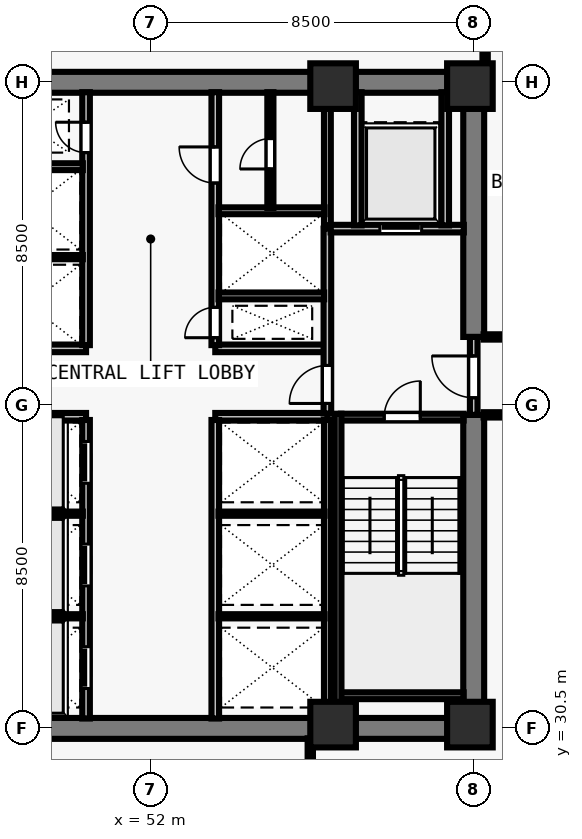
"""IFC4 building model, lengths in metres.
Left out: names, types, materials, properties, quantities, classifications, styles, units other than length and angle.
Written with IfcOpenShell. Run it as: python <this file> out.ifc"""

import sys

from ifc_helpers import new_model, si_unit, direction, frame, frame_2d, origin, origin_2d, place, context, subcontext, project, spatial, rectangle, extrude, element, fill, save


model = new_model("IFC4")
c1 = context("Model", 3, precision=1e-05, world=origin(), true_north=direction((0.0, 1.0)))
c2 = subcontext(c1, "Body", "Model", "MODEL_VIEW")
j1 = project(units=[si_unit("LENGTHUNIT", "METRE"), si_unit("PLANEANGLEUNIT", "RADIAN")], contexts=[c1])
p1 = place(None, origin())
s1 = spatial("IfcSite", under=j1, at=p1, CompositionType="ELEMENT")
p2 = place(p1, origin())
s2 = spatial("IfcBuilding", under=s1, at=p2, CompositionType="ELEMENT")
p3 = place(p2, frame((0.0, 0.0, 69.0)))
s3 = spatial("IfcBuildingStorey", under=s2, at=p3, CompositionType="ELEMENT", Elevation=69.0)
for number, where, z_axis, x_axis in (
    (1, (56.8, 30.6, 0.0), (0.0, 0.0, 1.0), (1.0, 0.0, 0.0)),
    (2, (60.4, 30.6, 0.0), (0.0, 0.0, 1.0), (1.0, 0.0, 0.0)),
    (3, (56.8, 47.4, 0.0), (0.0, 0.0, 1.0), (1.0, 0.0, 0.0)),
    (4, (60.4, 47.4, 0.0), (0.0, 0.0, 1.0), (1.0, 0.0, 0.0)),
):
    element("IfcColumn", number, at=place(p3, frame(where, z_axis=z_axis, x_axis=x_axis)), inside=s3, PredefinedType="COLUMN", context=c2, shape_type="SweptSolid", body=[
        extrude(rectangle(XDim=1.2, YDim=1.2, at=origin_2d()), origin(), (0.0, 0.0, 1.0), 3.5),
    ])
for number, where, z_axis, x_axis in (
    (5, (43.225, 30.5, 0.0), (0.0, 0.0, 1.0), (1.0, 0.0, 0.0)),
    (6, (43.225, 47.5, 0.0), (0.0, 0.0, 1.0), (1.0, 0.0, 0.0)),
):
    element("IfcWall", number, at=place(p3, frame(where, z_axis=z_axis, x_axis=x_axis)), inside=s3, PredefinedType="SHEAR", context=c2, shape_type="SweptSolid", body=[
        extrude(rectangle(XDim=17.55, YDim=0.55, at=frame_2d((8.775, 0.0))), origin(), (0.0, 0.0, 1.0), 3.28),
    ])
p4 = place(p3, frame((60.5, 30.765, 0.0), z_axis=(0.0, 0.0, 1.0), x_axis=(0.0, 1.0, 0.0)))
e7 = element("IfcWall", 7, at=p4, inside=s3, PredefinedType="SHEAR", context=c2, shape_type="SweptSolid", body=[
    extrude(rectangle(XDim=7.985, YDim=0.55, at=frame_2d((3.993, 0.0))), origin(), (0.0, 0.0, 1.0), 3.28),
])
p5 = place(p3, frame((60.5, 40.8, 0.0), z_axis=(0.0, 0.0, 1.0), x_axis=(0.0, 1.0, 0.0)))
e8 = element("IfcWall", 8, at=p5, inside=s3, PredefinedType="SHEAR", context=c2, shape_type="SweptSolid", body=[
    extrude(rectangle(XDim=6.435, YDim=0.55, at=frame_2d((3.218, 0.0))), origin(), (0.0, 0.0, 1.0), 3.28),
])
for number, where, z_axis, x_axis in (
    (9, (47.35, 38.7, 0.0), (0.0, 0.0, 1.0), (1.0, 0.0, 0.0)),
    (10, (47.35, 40.5, 0.0), (0.0, 0.0, 1.0), (1.0, 0.0, 0.0)),
    (11, (53.7, 38.7, 0.0), (0.0, 0.0, 1.0), (1.0, 0.0, 0.0)),
    (12, (53.7, 40.5, 0.0), (0.0, 0.0, 1.0), (1.0, 0.0, 0.0)),
):
    element("IfcWall", number, at=place(p3, frame(where, z_axis=z_axis, x_axis=x_axis)), inside=s3, PredefinedType="SOLIDWALL", context=c2, shape_type="SweptSolid", body=[
        extrude(rectangle(XDim=2.95, YDim=0.2, at=frame_2d((1.475, 0.0))), origin(), (0.0, 0.0, 1.0), 3.28),
    ])
p6 = place(p3, frame((50.3, 30.76, 0.0), z_axis=(0.0, 0.0, 1.0), x_axis=(0.0, 1.0, 0.0)))
e13 = element("IfcWall", 13, at=p6, inside=s3, PredefinedType="SOLIDWALL", context=c2, shape_type="SweptSolid", body=[
    extrude(rectangle(XDim=7.855, YDim=0.2, at=frame_2d((3.927, 0.0))), origin(), (0.0, 0.0, 1.0), 3.28),
])
p7 = place(p6, frame((0.79, 0.0, 0.0)))
e14 = element("IfcOpeningElement", 14, at=p7, cuts=e13, PredefinedType="OPENING", context=c2, shape_type="SweptSolid", body=[
    extrude(rectangle(XDim=1.1, YDim=2.2, at=frame_2d((0.55, 1.1))), frame((0.0, 0.11, 0.0), z_axis=(0.0, -1.0, 0.0), x_axis=(1.0, 0.0, 0.0)), (0.0, 0.0, 1.0), 0.22),
])
p8 = place(p6, frame((3.49, 0.0, 0.0)))
e15 = element("IfcOpeningElement", 15, at=p8, cuts=e13, PredefinedType="OPENING", context=c2, shape_type="SweptSolid", body=[
    extrude(rectangle(XDim=1.1, YDim=2.2, at=frame_2d((0.55, 1.1))), frame((0.0, 0.11, 0.0), z_axis=(0.0, -1.0, 0.0), x_axis=(1.0, 0.0, 0.0)), (0.0, 0.0, 1.0), 0.22),
])
p9 = place(p6, frame((6.19, 0.0, 0.0)))
e16 = element("IfcOpeningElement", 16, at=p9, cuts=e13, PredefinedType="OPENING", context=c2, shape_type="SweptSolid", body=[
    extrude(rectangle(XDim=1.1, YDim=2.2, at=frame_2d((0.55, 1.1))), frame((0.0, 0.11, 0.0), z_axis=(0.0, -1.0, 0.0), x_axis=(1.0, 0.0, 0.0)), (0.0, 0.0, 1.0), 0.22),
])
p10 = place(p3, frame((53.7, 30.76, 0.0), z_axis=(0.0, 0.0, 1.0), x_axis=(0.0, 1.0, 0.0)))
e17 = element("IfcWall", 17, at=p10, inside=s3, PredefinedType="SOLIDWALL", context=c2, shape_type="SweptSolid", body=[
    extrude(rectangle(XDim=7.855, YDim=0.2, at=frame_2d((3.927, 0.0))), origin(), (0.0, 0.0, 1.0), 3.28),
])
p11 = place(p3, frame((50.3, 40.585, 0.0), z_axis=(0.0, 0.0, 1.0), x_axis=(0.0, 1.0, 0.0)))
e18 = element("IfcWall", 18, at=p11, inside=s3, PredefinedType="SOLIDWALL", context=c2, shape_type="SweptSolid", body=[
    extrude(rectangle(XDim=6.655, YDim=0.2, at=frame_2d((3.328, 0.0))), origin(), (0.0, 0.0, 1.0), 3.28),
])
p12 = place(p11, frame((5.065, 0.0, 0.0)))
e19 = element("IfcOpeningElement", 19, at=p12, cuts=e18, PredefinedType="OPENING", context=c2, shape_type="SweptSolid", body=[
    extrude(rectangle(XDim=0.8, YDim=2.08, at=frame_2d((0.4, 1.04))), frame((0.0, 0.11, 0.0), z_axis=(0.0, -1.0, 0.0), x_axis=(1.0, 0.0, 0.0)), (0.0, 0.0, 1.0), 0.22),
])
p13 = place(p3, frame((53.7, 40.585, 0.0), z_axis=(0.0, 0.0, 1.0), x_axis=(0.0, 1.0, 0.0)))
e20 = element("IfcWall", 20, at=p13, inside=s3, PredefinedType="SOLIDWALL", context=c2, shape_type="SweptSolid", body=[
    extrude(rectangle(XDim=6.655, YDim=0.2, at=frame_2d((3.328, 0.0))), origin(), (0.0, 0.0, 1.0), 3.28),
])
p14 = place(p13, frame((0.195, 0.0, 0.0)))
e21 = element("IfcOpeningElement", 21, at=p14, cuts=e20, PredefinedType="OPENING", context=c2, shape_type="SweptSolid", body=[
    extrude(rectangle(XDim=0.8, YDim=2.08, at=frame_2d((0.4, 1.04))), frame((0.0, 0.11, 0.0), z_axis=(0.0, -1.0, 0.0), x_axis=(1.0, 0.0, 0.0)), (0.0, 0.0, 1.0), 0.22),
])
p15 = place(p13, frame((4.265, 0.0, 0.0)))
e22 = element("IfcOpeningElement", 22, at=p15, cuts=e20, PredefinedType="OPENING", context=c2, shape_type="SweptSolid", body=[
    extrude(rectangle(XDim=0.95, YDim=2.12, at=frame_2d((0.475, 1.06))), frame((0.0, 0.11, 0.0), z_axis=(0.0, -1.0, 0.0), x_axis=(1.0, 0.0, 0.0)), (0.0, 0.0, 1.0), 0.22),
])
p16 = place(p3, frame((60.5, 38.75, 0.0), z_axis=(0.0, 0.0, 1.0), x_axis=(0.0, 1.0, 0.0)))
e23 = element("IfcWall", 23, at=p16, inside=s3, PredefinedType="SOLIDWALL", context=c2, shape_type="SweptSolid", body=[
    extrude(rectangle(XDim=2.05, YDim=0.2, at=frame_2d((1.025, 0.0))), origin(), (0.0, 0.0, 1.0), 3.28),
])
p17 = place(p16, frame((0.45, 0.0, 0.0)))
e24 = element("IfcOpeningElement", 24, at=p17, cuts=e23, PredefinedType="OPENING", context=c2, shape_type="SweptSolid", body=[
    extrude(rectangle(XDim=1.1, YDim=2.15, at=frame_2d((0.55, 1.075))), frame((0.0, 0.11, 0.0), z_axis=(0.0, -1.0, 0.0), x_axis=(1.0, 0.0, 0.0)), (0.0, 0.0, 1.0), 0.22),
])
p18 = place(p3, frame((56.65, 38.785, 0.0), z_axis=(0.0, 0.0, 1.0), x_axis=(0.0, 1.0, 0.0)))
e25 = element("IfcWall", 25, at=p18, inside=s3, PredefinedType="SOLIDWALL", context=c2, shape_type="SweptSolid", body=[
    extrude(rectangle(XDim=4.865, YDim=0.2, at=frame_2d((2.433, 0.0))), origin(), (0.0, 0.0, 1.0), 3.28),
])
p19 = place(p18, frame((0.265, 0.0, 0.0)))
e26 = element("IfcOpeningElement", 26, at=p19, cuts=e25, PredefinedType="OPENING", context=c2, shape_type="SweptSolid", body=[
    extrude(rectangle(XDim=1.0, YDim=2.15, at=frame_2d((0.5, 1.075))), frame((0.0, 0.11, 0.0), z_axis=(0.0, -1.0, 0.0), x_axis=(1.0, 0.0, 0.0)), (0.0, 0.0, 1.0), 0.22),
])
p20 = place(p3, frame((56.735, 43.65, 0.0), z_axis=(0.0, 0.0, 1.0), x_axis=(1.0, 0.0, 0.0)))
e27 = element("IfcWall", 27, at=p20, inside=s3, PredefinedType="SOLIDWALL", context=c2, shape_type="SweptSolid", body=[
    extrude(rectangle(XDim=3.505, YDim=0.2, at=frame_2d((1.752, 0.0))), origin(), (0.0, 0.0, 1.0), 3.28),
])
p21 = place(p20, frame((1.295, 0.0, 0.0)))
e28 = element("IfcOpeningElement", 28, at=p21, cuts=e27, PredefinedType="OPENING", context=c2, shape_type="SweptSolid", body=[
    extrude(rectangle(XDim=1.1, YDim=2.2, at=frame_2d((0.55, 1.1))), frame((0.0, 0.11, 0.0), z_axis=(0.0, -1.0, 0.0), x_axis=(1.0, 0.0, 0.0)), (0.0, 0.0, 1.0), 0.22),
])
for number, where, z_axis, x_axis in (
    (29, (57.45, 43.735, 0.0), (0.0, 0.0, 1.0), (0.0, 1.0, 0.0)),
    (30, (59.75, 43.735, 0.0), (0.0, 0.0, 1.0), (0.0, 1.0, 0.0)),
):
    element("IfcWall", number, at=place(p3, frame(where, z_axis=z_axis, x_axis=x_axis)), inside=s3, PredefinedType="SOLIDWALL", context=c2, shape_type="SweptSolid", body=[
        extrude(rectangle(XDim=3.505, YDim=0.2, at=frame_2d((1.752, 0.0))), origin(), (0.0, 0.0, 1.0), 3.28),
    ])
for number, where, z_axis, x_axis in (
    (31, (47.425, 33.45, 0.0), (0.0, 0.0, 1.0), (1.0, 0.0, 0.0)),
    (32, (47.425, 36.15, 0.0), (0.0, 0.0, 1.0), (1.0, 0.0, 0.0)),
):
    element("IfcWall", number, at=place(p3, frame(where, z_axis=z_axis, x_axis=x_axis)), inside=s3, PredefinedType="PARTITIONING", context=c2, shape_type="SweptSolid", body=[
        extrude(rectangle(XDim=2.79, YDim=0.11, at=frame_2d((1.395, 0.0))), origin(), (0.0, 0.0, 1.0), 3.28),
    ])
p22 = place(p3, frame((56.65, 30.76, 0.0), z_axis=(0.0, 0.0, 1.0), x_axis=(0.0, 1.0, 0.0)))
e33 = element("IfcWall", 33, at=p22, inside=s3, PredefinedType="SOLIDWALL", context=c2, shape_type="SweptSolid", body=[
    extrude(rectangle(XDim=7.855, YDim=0.18, at=frame_2d((3.927, 0.0))), origin(), (0.0, 0.0, 1.0), 3.28),
])
for number, where, z_axis, x_axis in (
    (34, (53.785, 33.45, 0.0), (0.0, 0.0, 1.0), (1.0, 0.0, 0.0)),
    (35, (53.785, 36.15, 0.0), (0.0, 0.0, 1.0), (1.0, 0.0, 0.0)),
):
    element("IfcWall", number, at=place(p3, frame(where, z_axis=z_axis, x_axis=x_axis)), inside=s3, PredefinedType="PARTITIONING", context=c2, shape_type="SweptSolid", body=[
        extrude(rectangle(XDim=2.79, YDim=0.11, at=frame_2d((1.395, 0.0))), origin(), (0.0, 0.0, 1.0), 3.28),
    ])
p23 = place(p3, frame((47.435, 42.9, 0.0), z_axis=(0.0, 0.0, 1.0), x_axis=(1.0, 0.0, 0.0)))
e36 = element("IfcWall", 36, at=p23, inside=s3, PredefinedType="PARTITIONING", context=c2, shape_type="SweptSolid", body=[
    extrude(rectangle(XDim=2.78, YDim=0.11, at=frame_2d((1.39, 0.0))), origin(), (0.0, 0.0, 1.0), 3.28),
])
p24 = place(p3, frame((47.425, 45.28, 0.0), z_axis=(0.0, 0.0, 1.0), x_axis=(1.0, 0.0, 0.0)))
e37 = element("IfcWall", 37, at=p24, inside=s3, PredefinedType="SOLIDWALL", context=c2, shape_type="SweptSolid", body=[
    extrude(rectangle(XDim=2.79, YDim=0.18, at=frame_2d((1.395, 0.0))), origin(), (0.0, 0.0, 1.0), 3.28),
])
p25 = place(p3, frame((56.65, 43.735, 0.0), z_axis=(0.0, 0.0, 1.0), x_axis=(0.0, 1.0, 0.0)))
e38 = element("IfcWall", 38, at=p25, inside=s3, PredefinedType="SOLIDWALL", context=c2, shape_type="SweptSolid", body=[
    extrude(rectangle(XDim=3.505, YDim=0.18, at=frame_2d((1.752, 0.0))), origin(), (0.0, 0.0, 1.0), 3.28),
])
p26 = place(p3, frame((53.785, 41.88, 0.0), z_axis=(0.0, 0.0, 1.0), x_axis=(1.0, 0.0, 0.0)))
e39 = element("IfcWall", 39, at=p26, inside=s3, PredefinedType="SOLIDWALL", context=c2, shape_type="SweptSolid", body=[
    extrude(rectangle(XDim=2.78, YDim=0.18, at=frame_2d((1.39, 0.0))), origin(), (0.0, 0.0, 1.0), 3.28),
])
p27 = place(p3, frame((53.785, 44.12, 0.0), z_axis=(0.0, 0.0, 1.0), x_axis=(1.0, 0.0, 0.0)))
e40 = element("IfcWall", 40, at=p27, inside=s3, PredefinedType="SOLIDWALL", context=c2, shape_type="SweptSolid", body=[
    extrude(rectangle(XDim=2.79, YDim=0.18, at=frame_2d((1.395, 0.0))), origin(), (0.0, 0.0, 1.0), 3.28),
])
p28 = place(p3, frame((55.15, 44.195, 0.0), z_axis=(0.0, 0.0, 1.0), x_axis=(0.0, 1.0, 0.0)))
e41 = element("IfcWall", 41, at=p28, inside=s3, PredefinedType="PARTITIONING", context=c2, shape_type="SweptSolid", body=[
    extrude(rectangle(XDim=3.045, YDim=0.16, at=frame_2d((1.522, 0.0))), origin(), (0.0, 0.0, 1.0), 3.28),
])
p29 = place(p28, frame((1.025, 0.0, 0.0)))
e42 = element("IfcOpeningElement", 42, at=p29, cuts=e41, PredefinedType="OPENING", context=c2, shape_type="SweptSolid", body=[
    extrude(rectangle(XDim=0.8, YDim=2.1, at=frame_2d((0.4, 1.05))), frame((0.0, 0.09, 0.0), z_axis=(0.0, -1.0, 0.0), x_axis=(1.0, 0.0, 0.0)), (0.0, 0.0, 1.0), 0.18),
])
for number, where, z_axis, x_axis in (
    (43, (60.76, 38.75, 0.0), (0.0, 0.0, 1.0), (1.0, 0.0, 0.0)),
    (44, (60.76, 40.8, 0.0), (0.0, 0.0, 1.0), (1.0, 0.0, 0.0)),
):
    element("IfcWall", number, at=place(p3, frame(where, z_axis=z_axis, x_axis=x_axis)), inside=s3, PredefinedType="PARTITIONING", context=c2, shape_type="SweptSolid", body=[
        extrude(rectangle(XDim=5.985, YDim=0.14, at=frame_2d((2.993, 0.0))), origin(), (0.0, 0.0, 1.0), 3.28),
    ])
p30 = place(p3, frame((56.2, 23.655, 0.0), z_axis=(0.0, 0.0, 1.0), x_axis=(0.0, 1.0, 0.0)))
e45 = element("IfcWall", 45, at=p30, inside=s3, PredefinedType="PARTITIONING", context=c2, shape_type="SweptSolid", body=[
    extrude(rectangle(XDim=6.585, YDim=0.14, at=frame_2d((3.292, 0.0))), origin(), (0.0, 0.0, 1.0), 2.849),
])
p31 = place(p3, frame((60.8, 47.76, 0.0), z_axis=(0.0, 0.0, 1.0), x_axis=(0.0, 1.0, 0.0)))
e46 = element("IfcWall", 46, at=p31, inside=s3, PredefinedType="PARTITIONING", context=c2, shape_type="SweptSolid", body=[
    extrude(rectangle(XDim=6.585, YDim=0.14, at=frame_2d((3.292, 0.0))), origin(), (0.0, 0.0, 1.0), 2.439),
])
p32 = place(p3, frame((57.005, 38.69, 0.0), z_axis=(0.0, 0.0, 1.0), x_axis=(1.0, 0.0, 0.0)))
e47 = element("IfcWall", 47, at=p32, inside=s3, PredefinedType="SOLIDWALL", context=c2, shape_type="SweptSolid", body=[
    extrude(rectangle(XDim=3.23, YDim=0.18, at=frame_2d((1.615, 0.0))), origin(), (0.0, 0.0, 1.0), 3.28),
])
p33 = place(p32, frame((1.14, 0.0, 0.0)))
e48 = element("IfcOpeningElement", 48, at=p33, cuts=e47, PredefinedType="OPENING", context=c2, shape_type="SweptSolid", body=[
    extrude(rectangle(XDim=0.95, YDim=2.15, at=frame_2d((0.475, 1.075))), frame((0.0, 0.1, 0.0), z_axis=(0.0, -1.0, 0.0), x_axis=(1.0, 0.0, 0.0)), (0.0, 0.0, 1.0), 0.2),
])
p34 = place(p3, frame((57.005, 31.36, 0.0), z_axis=(0.0, 0.0, 1.0), x_axis=(1.0, 0.0, 0.0)))
e49 = element("IfcWall", 49, at=p34, inside=s3, PredefinedType="SOLIDWALL", context=c2, shape_type="SweptSolid", body=[
    extrude(rectangle(XDim=3.23, YDim=0.18, at=frame_2d((1.615, 0.0))), origin(), (0.0, 0.0, 1.0), 3.28),
])
p35 = place(p3, frame((56.93, 38.78, 0.0), z_axis=(0.0, 0.0, 1.0), x_axis=(0.0, -1.0, 0.0)))
e50 = element("IfcWall", 50, at=p35, inside=s3, PredefinedType="SOLIDWALL", context=c2, shape_type="SweptSolid", body=[
    extrude(rectangle(XDim=8.017, YDim=0.18, at=frame_2d((4.009, 0.0))), origin(), (0.0, 0.0, 1.0), 3.28),
])
p36 = place(p17, origin())
e51 = element("IfcDoor", 51, at=p36, inside=s3, OperationType="SINGLE_SWING_RIGHT", PredefinedType="DOOR", context=c2, shape_type="SweptSolid", body=[
    extrude(rectangle(XDim=1.1, YDim=2.15, at=frame_2d((0.55, 1.075))), frame((0.0, 0.025, 0.0), z_axis=(0.0, -1.0, 0.0), x_axis=(1.0, 0.0, 0.0)), (0.0, 0.0, 1.0), 0.05),
])
fill(e24, e51)
p37 = place(p19, origin())
e52 = element("IfcDoor", 52, at=p37, inside=s3, OperationType="SINGLE_SWING_LEFT", PredefinedType="DOOR", context=c2, shape_type="SweptSolid", body=[
    extrude(rectangle(XDim=1.0, YDim=2.15, at=frame_2d((0.5, 1.075))), frame((0.0, 0.025, 0.0), z_axis=(0.0, -1.0, 0.0), x_axis=(1.0, 0.0, 0.0)), (0.0, 0.0, 1.0), 0.05),
])
fill(e26, e52)
p38 = place(p21, origin())
e53 = element("IfcDoor", 53, at=p38, inside=s3, OperationType="SLIDING_TO_LEFT", PredefinedType="DOOR", context=c2, shape_type="SweptSolid", body=[
    extrude(rectangle(XDim=1.1, YDim=2.2, at=frame_2d((0.55, 1.1))), frame((0.0, 0.025, 0.0), z_axis=(0.0, -1.0, 0.0), x_axis=(1.0, 0.0, 0.0)), (0.0, 0.0, 1.0), 0.05),
])
fill(e28, e53)
p39 = place(p7, origin())
e54 = element("IfcDoor", 54, at=p39, inside=s3, OperationType="SLIDING_TO_LEFT", PredefinedType="DOOR", context=c2, shape_type="SweptSolid", body=[
    extrude(rectangle(XDim=1.1, YDim=2.2, at=frame_2d((0.55, 1.1))), frame((0.0, 0.025, 0.0), z_axis=(0.0, -1.0, 0.0), x_axis=(1.0, 0.0, 0.0)), (0.0, 0.0, 1.0), 0.05),
])
fill(e14, e54)
p40 = place(p8, origin())
e55 = element("IfcDoor", 55, at=p40, inside=s3, OperationType="SLIDING_TO_LEFT", PredefinedType="DOOR", context=c2, shape_type="SweptSolid", body=[
    extrude(rectangle(XDim=1.1, YDim=2.2, at=frame_2d((0.55, 1.1))), frame((0.0, 0.025, 0.0), z_axis=(0.0, -1.0, 0.0), x_axis=(1.0, 0.0, 0.0)), (0.0, 0.0, 1.0), 0.05),
])
fill(e15, e55)
p41 = place(p9, origin())
e56 = element("IfcDoor", 56, at=p41, inside=s3, OperationType="SLIDING_TO_LEFT", PredefinedType="DOOR", context=c2, shape_type="SweptSolid", body=[
    extrude(rectangle(XDim=1.1, YDim=2.2, at=frame_2d((0.55, 1.1))), frame((0.0, 0.025, 0.0), z_axis=(0.0, -1.0, 0.0), x_axis=(1.0, 0.0, 0.0)), (0.0, 0.0, 1.0), 0.05),
])
fill(e16, e56)
p42 = place(p12, origin())
e57 = element("IfcDoor", 57, at=p42, inside=s3, OperationType="SINGLE_SWING_RIGHT", PredefinedType="DOOR", context=c2, shape_type="SweptSolid", body=[
    extrude(rectangle(XDim=0.8, YDim=2.08, at=frame_2d((0.4, 1.04))), frame((0.0, 0.025, 0.0), z_axis=(0.0, -1.0, 0.0), x_axis=(1.0, 0.0, 0.0)), (0.0, 0.0, 1.0), 0.05),
])
fill(e19, e57)
p43 = place(p14, origin())
e58 = element("IfcDoor", 58, at=p43, inside=s3, OperationType="SINGLE_SWING_LEFT", PredefinedType="DOOR", context=c2, shape_type="SweptSolid", body=[
    extrude(rectangle(XDim=0.8, YDim=2.08, at=frame_2d((0.4, 1.04))), frame((0.0, 0.025, 0.0), z_axis=(0.0, -1.0, 0.0), x_axis=(1.0, 0.0, 0.0)), (0.0, 0.0, 1.0), 0.05),
])
fill(e21, e58)
p44 = place(p15, origin())
e59 = element("IfcDoor", 59, at=p44, inside=s3, OperationType="SINGLE_SWING_RIGHT", PredefinedType="DOOR", context=c2, shape_type="SweptSolid", body=[
    extrude(rectangle(XDim=0.95, YDim=2.12, at=frame_2d((0.475, 1.06))), frame((0.0, 0.025, 0.0), z_axis=(0.0, -1.0, 0.0), x_axis=(1.0, 0.0, 0.0)), (0.0, 0.0, 1.0), 0.05),
])
fill(e22, e59)
p45 = place(p29, origin())
e60 = element("IfcDoor", 60, at=p45, inside=s3, OperationType="SINGLE_SWING_LEFT", PredefinedType="DOOR", context=c2, shape_type="SweptSolid", body=[
    extrude(rectangle(XDim=0.8, YDim=2.1, at=frame_2d((0.4, 1.05))), frame((0.0, 0.025, 0.0), z_axis=(0.0, -1.0, 0.0), x_axis=(1.0, 0.0, 0.0)), (0.0, 0.0, 1.0), 0.05),
])
fill(e42, e60)
p46 = place(p33, origin())
e61 = element("IfcDoor", 61, at=p46, inside=s3, OperationType="SINGLE_SWING_RIGHT", PredefinedType="DOOR", context=c2, shape_type="SweptSolid", body=[
    extrude(rectangle(XDim=0.95, YDim=2.15, at=frame_2d((0.475, 1.075))), frame((0.0, 0.025, 0.0), z_axis=(0.0, -1.0, 0.0), x_axis=(1.0, 0.0, 0.0)), (0.0, 0.0, 1.0), 0.05),
])
fill(e48, e61)
save(model, sys.argv[1])
